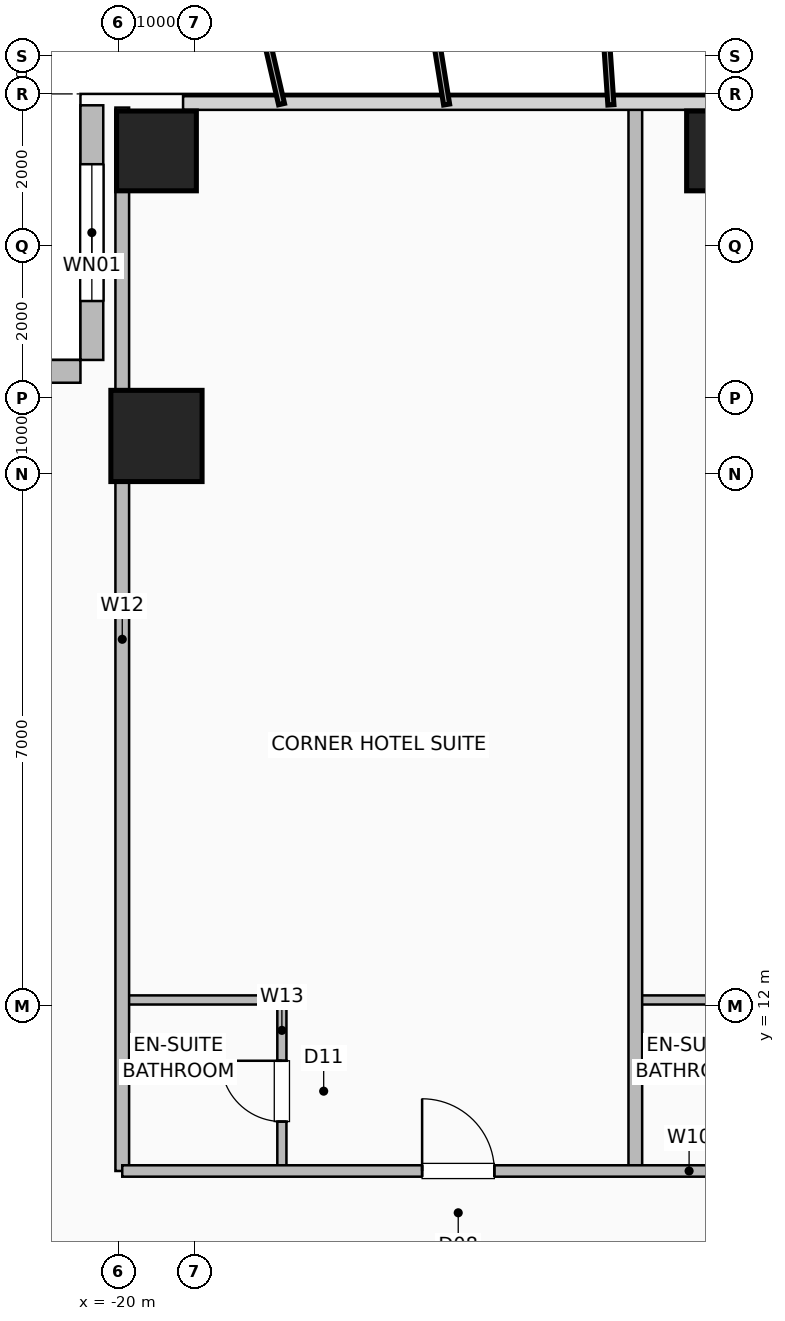
"""IFC4 building model, lengths in metres.
Left out: names, types, materials, properties, quantities, classifications, styles, units other than length and angle.
Written with IfcOpenShell. Run it as: python <this file> out.ifc"""

import sys

from ifc_helpers import new_model, si_unit, direction, frame, frame_2d, origin, origin_2d, place, context, subcontext, project, spatial, rectangle, hollow_rectangle, extrude, element, fill, save


model = new_model("IFC4")
c1 = context("Model", 3, precision=1e-05, world=origin(), true_north=direction((0.0, 1.0)))
c2 = subcontext(c1, "Body", "Model", "MODEL_VIEW")
j1 = project(units=[si_unit("LENGTHUNIT", "METRE"), si_unit("PLANEANGLEUNIT", "RADIAN")], contexts=[c1])
p1 = place(None, origin())
s1 = spatial("IfcSite", under=j1, at=p1, CompositionType="ELEMENT")
p2 = place(p1, origin())
s2 = spatial("IfcBuilding", under=s1, at=p2, CompositionType="ELEMENT")
p3 = place(p2, frame((0.0, 0.0, 69.0)))
s3 = spatial("IfcBuildingStorey", under=s2, at=p3, CompositionType="ELEMENT", Elevation=69.0)
for number, where, z_axis, x_axis in (
    (1, (-19.5, 23.25, 0.0), (0.0, 0.0, 1.0), (1.0, 0.0, 0.0)),
    (2, (-12.0, 23.25, 0.0), (0.0, 0.0, 1.0), (1.0, 0.0, 0.0)),
):
    element("IfcColumn", number, at=place(p3, frame(where, z_axis=z_axis, x_axis=x_axis)), inside=s3, PredefinedType="COLUMN", context=c2, shape_type="SweptSolid", body=[
        extrude(hollow_rectangle(XDim=1.05, YDim=1.05, WallThickness=0.05, at=origin_2d()), origin(), (0.0, 0.0, 1.0), 3.5),
    ])
p4 = place(p3, frame((-19.5, 19.5, 0.0), z_axis=(0.0, 0.0, 1.0), x_axis=(1.0, 0.0, 0.0)))
e3 = element("IfcColumn", 3, at=p4, inside=s3, PredefinedType="COLUMN", context=c2, shape_type="SweptSolid", body=[
    extrude(hollow_rectangle(XDim=1.2, YDim=1.2, WallThickness=0.055, at=origin_2d()), origin(), (0.0, 0.0, 1.0), 3.5),
])
p5 = place(p3, frame((-20.35, 23.85, 0.0), z_axis=(0.0, 0.0, 1.0), x_axis=(0.0, -1.0, 0.0)))
e4 = element("IfcWall", 4, at=p5, inside=s3, PredefinedType="SOLIDWALL", context=c2, shape_type="SweptSolid", body=[
    extrude(rectangle(XDim=3.35, YDim=0.3, at=frame_2d((1.675, 0.0))), origin(), (0.0, 0.0, 1.0), 3.25),
])
p6 = place(p5, frame((0.775, 0.0, 0.9)))
e5 = element("IfcOpeningElement", 5, at=p6, cuts=e4, PredefinedType="OPENING", context=c2, shape_type="SweptSolid", body=[
    extrude(rectangle(XDim=1.8, YDim=1.8, at=frame_2d((0.9, 0.9))), frame((0.0, 0.16, 0.0), z_axis=(0.0, -1.0, 0.0), x_axis=(1.0, 0.0, 0.0)), (0.0, 0.0, 1.0), 0.32),
])
p7 = place(p3, frame((-23.85, 20.35, 0.0), z_axis=(0.0, 0.0, 1.0), x_axis=(1.0, 0.0, 0.0)))
e6 = element("IfcWall", 6, at=p7, inside=s3, PredefinedType="SOLIDWALL", context=c2, shape_type="SweptSolid", body=[
    extrude(rectangle(XDim=3.35, YDim=0.3, at=frame_2d((1.675, 0.0))), origin(), (0.0, 0.0, 1.0), 3.25),
])
p8 = place(p3, frame((-17.85, 9.83, 0.0), z_axis=(0.0, 0.0, 1.0), x_axis=(0.0, 1.0, 0.0)))
e7 = element("IfcWall", 7, at=p8, inside=s3, PredefinedType="PLUMBINGWALL", context=c2, shape_type="SweptSolid", body=[
    extrude(rectangle(XDim=2.25, YDim=0.12, at=frame_2d((1.125, 0.0))), origin(), (0.0, 0.0, 1.0), 3.25),
])
p9 = place(p8, frame((0.65, 0.0, 0.0)))
e8 = element("IfcOpeningElement", 8, at=p9, cuts=e7, PredefinedType="OPENING", context=c2, shape_type="SweptSolid", body=[
    extrude(rectangle(XDim=0.8, YDim=2.05, at=frame_2d((0.4, 1.025))), frame((0.0, 0.07, 0.0), z_axis=(0.0, -1.0, 0.0), x_axis=(1.0, 0.0, 0.0)), (0.0, 0.0, 1.0), 0.14),
])
for number, where, z_axis, x_axis in (
    (9, (-19.92, 12.08, 0.0), (0.0, 0.0, 1.0), (1.0, 0.0, 0.0)),
    (10, (-13.17, 12.08, 0.0), (0.0, 0.0, 1.0), (1.0, 0.0, 0.0)),
):
    element("IfcWall", number, at=place(p3, frame(where, z_axis=z_axis, x_axis=x_axis)), inside=s3, PredefinedType="PLUMBINGWALL", context=c2, shape_type="SweptSolid", body=[
        extrude(rectangle(XDim=2.1, YDim=0.12, at=frame_2d((1.05, 0.0))), origin(), (0.0, 0.0, 1.0), 3.25),
    ])
for number, where, z_axis, x_axis in (
    (11, (-19.95, 9.83, 0.0), (0.0, 0.0, 1.0), (0.0, 1.0, 0.0)),
    (12, (-13.2, 9.83, 0.0), (0.0, 0.0, 1.0), (0.0, 1.0, 0.0)),
):
    element("IfcWall", number, at=place(p3, frame(where, z_axis=z_axis, x_axis=x_axis)), inside=s3, PredefinedType="PARTITIONING", context=c2, shape_type="SweptSolid", body=[
        extrude(rectangle(XDim=13.99, YDim=0.18, at=frame_2d((6.995, 0.0))), origin(), (0.0, 0.0, 1.0), 3.25),
    ])
p10 = place(p3, frame((-19.95, 9.83, 0.0), z_axis=(0.0, 0.0, 1.0), x_axis=(1.0, 0.0, 0.0)))
e13 = element("IfcWall", 13, at=p10, inside=s3, PredefinedType="PARTITIONING", context=c2, shape_type="SweptSolid", body=[
    extrude(rectangle(XDim=39.9, YDim=0.15, at=frame_2d((19.95, 0.0))), origin(), (0.0, 0.0, 1.0), 3.25),
])
p11 = place(p10, frame((3.945, 0.0, 0.0)))
e14 = element("IfcOpeningElement", 14, at=p11, cuts=e13, PredefinedType="OPENING", context=c2, shape_type="SweptSolid", body=[
    extrude(rectangle(XDim=0.95, YDim=2.08, at=frame_2d((0.475, 1.04))), frame((0.0, 0.085, 0.0), z_axis=(0.0, -1.0, 0.0), x_axis=(1.0, 0.0, 0.0)), (0.0, 0.0, 1.0), 0.17),
])
p12 = place(p10, frame((10.02, 0.0, 0.0)))
e15 = element("IfcOpeningElement", 15, at=p12, cuts=e13, PredefinedType="OPENING", context=c2, shape_type="SweptSolid", body=[
    extrude(rectangle(XDim=0.95, YDim=2.08, at=frame_2d((0.475, 1.04))), frame((0.0, 0.085, 0.0), z_axis=(0.0, -1.0, 0.0), x_axis=(1.0, 0.0, 0.0)), (0.0, 0.0, 1.0), 0.17),
])
p13 = place(p10, frame((15.42, 0.0, 0.0)))
e16 = element("IfcOpeningElement", 16, at=p13, cuts=e13, PredefinedType="OPENING", context=c2, shape_type="SweptSolid", body=[
    extrude(rectangle(XDim=0.95, YDim=2.08, at=frame_2d((0.475, 1.04))), frame((0.0, 0.085, 0.0), z_axis=(0.0, -1.0, 0.0), x_axis=(1.0, 0.0, 0.0)), (0.0, 0.0, 1.0), 0.17),
])
p14 = place(p10, frame((20.702, 0.0, 0.0)))
e17 = element("IfcOpeningElement", 17, at=p14, cuts=e13, PredefinedType="OPENING", context=c2, shape_type="SweptSolid", body=[
    extrude(rectangle(XDim=0.95, YDim=2.08, at=frame_2d((0.475, 1.04))), frame((0.0, 0.085, 0.0), z_axis=(0.0, -1.0, 0.0), x_axis=(1.0, 0.0, 0.0)), (0.0, 0.0, 1.0), 0.17),
])
p15 = place(p10, frame((26.02, 0.0, 0.0)))
e18 = element("IfcOpeningElement", 18, at=p15, cuts=e13, PredefinedType="OPENING", context=c2, shape_type="SweptSolid", body=[
    extrude(rectangle(XDim=0.95, YDim=2.08, at=frame_2d((0.475, 1.04))), frame((0.0, 0.085, 0.0), z_axis=(0.0, -1.0, 0.0), x_axis=(1.0, 0.0, 0.0)), (0.0, 0.0, 1.0), 0.17),
])
p16 = place(p10, frame((31.37, 0.0, 0.0)))
e19 = element("IfcOpeningElement", 19, at=p16, cuts=e13, PredefinedType="OPENING", context=c2, shape_type="SweptSolid", body=[
    extrude(rectangle(XDim=0.95, YDim=2.08, at=frame_2d((0.475, 1.04))), frame((0.0, 0.085, 0.0), z_axis=(0.0, -1.0, 0.0), x_axis=(1.0, 0.0, 0.0)), (0.0, 0.0, 1.0), 0.17),
])
p17 = place(p10, frame((37.245, 0.0, 0.0)))
e20 = element("IfcOpeningElement", 20, at=p17, cuts=e13, PredefinedType="OPENING", context=c2, shape_type="SweptSolid", body=[
    extrude(rectangle(XDim=0.95, YDim=2.08, at=frame_2d((0.475, 1.04))), frame((0.0, 0.085, 0.0), z_axis=(0.0, -1.0, 0.0), x_axis=(1.0, 0.0, 0.0)), (0.0, 0.0, 1.0), 0.17),
])
p18 = place(p6, origin())
e21 = element("IfcWindow", 21, at=p18, inside=s3, PartitioningType="SINGLE_PANEL", PredefinedType="WINDOW", context=c2, shape_type="SweptSolid", body=[
    extrude(rectangle(XDim=1.8, YDim=1.8, at=frame_2d((0.9, 0.9))), frame((0.0, 0.03, 0.0), z_axis=(0.0, -1.0, 0.0), x_axis=(1.0, 0.0, 0.0)), (0.0, 0.0, 1.0), 0.06),
])
fill(e5, e21)
p19 = place(p9, origin())
e22 = element("IfcDoor", 22, at=p19, inside=s3, OperationType="SINGLE_SWING_RIGHT", PredefinedType="DOOR", context=c2, shape_type="SweptSolid", body=[
    extrude(rectangle(XDim=0.8, YDim=2.05, at=frame_2d((0.4, 1.025))), frame((0.0, 0.025, 0.0), z_axis=(0.0, -1.0, 0.0), x_axis=(1.0, 0.0, 0.0)), (0.0, 0.0, 1.0), 0.05),
])
fill(e8, e22)
p20 = place(p11, origin())
e23 = element("IfcDoor", 23, at=p20, inside=s3, OperationType="SINGLE_SWING_LEFT", PredefinedType="DOOR", context=c2, shape_type="SweptSolid", body=[
    extrude(rectangle(XDim=0.95, YDim=2.08, at=frame_2d((0.475, 1.04))), frame((0.0, 0.025, 0.0), z_axis=(0.0, -1.0, 0.0), x_axis=(1.0, 0.0, 0.0)), (0.0, 0.0, 1.0), 0.05),
])
fill(e14, e23)
save(model, sys.argv[1])
